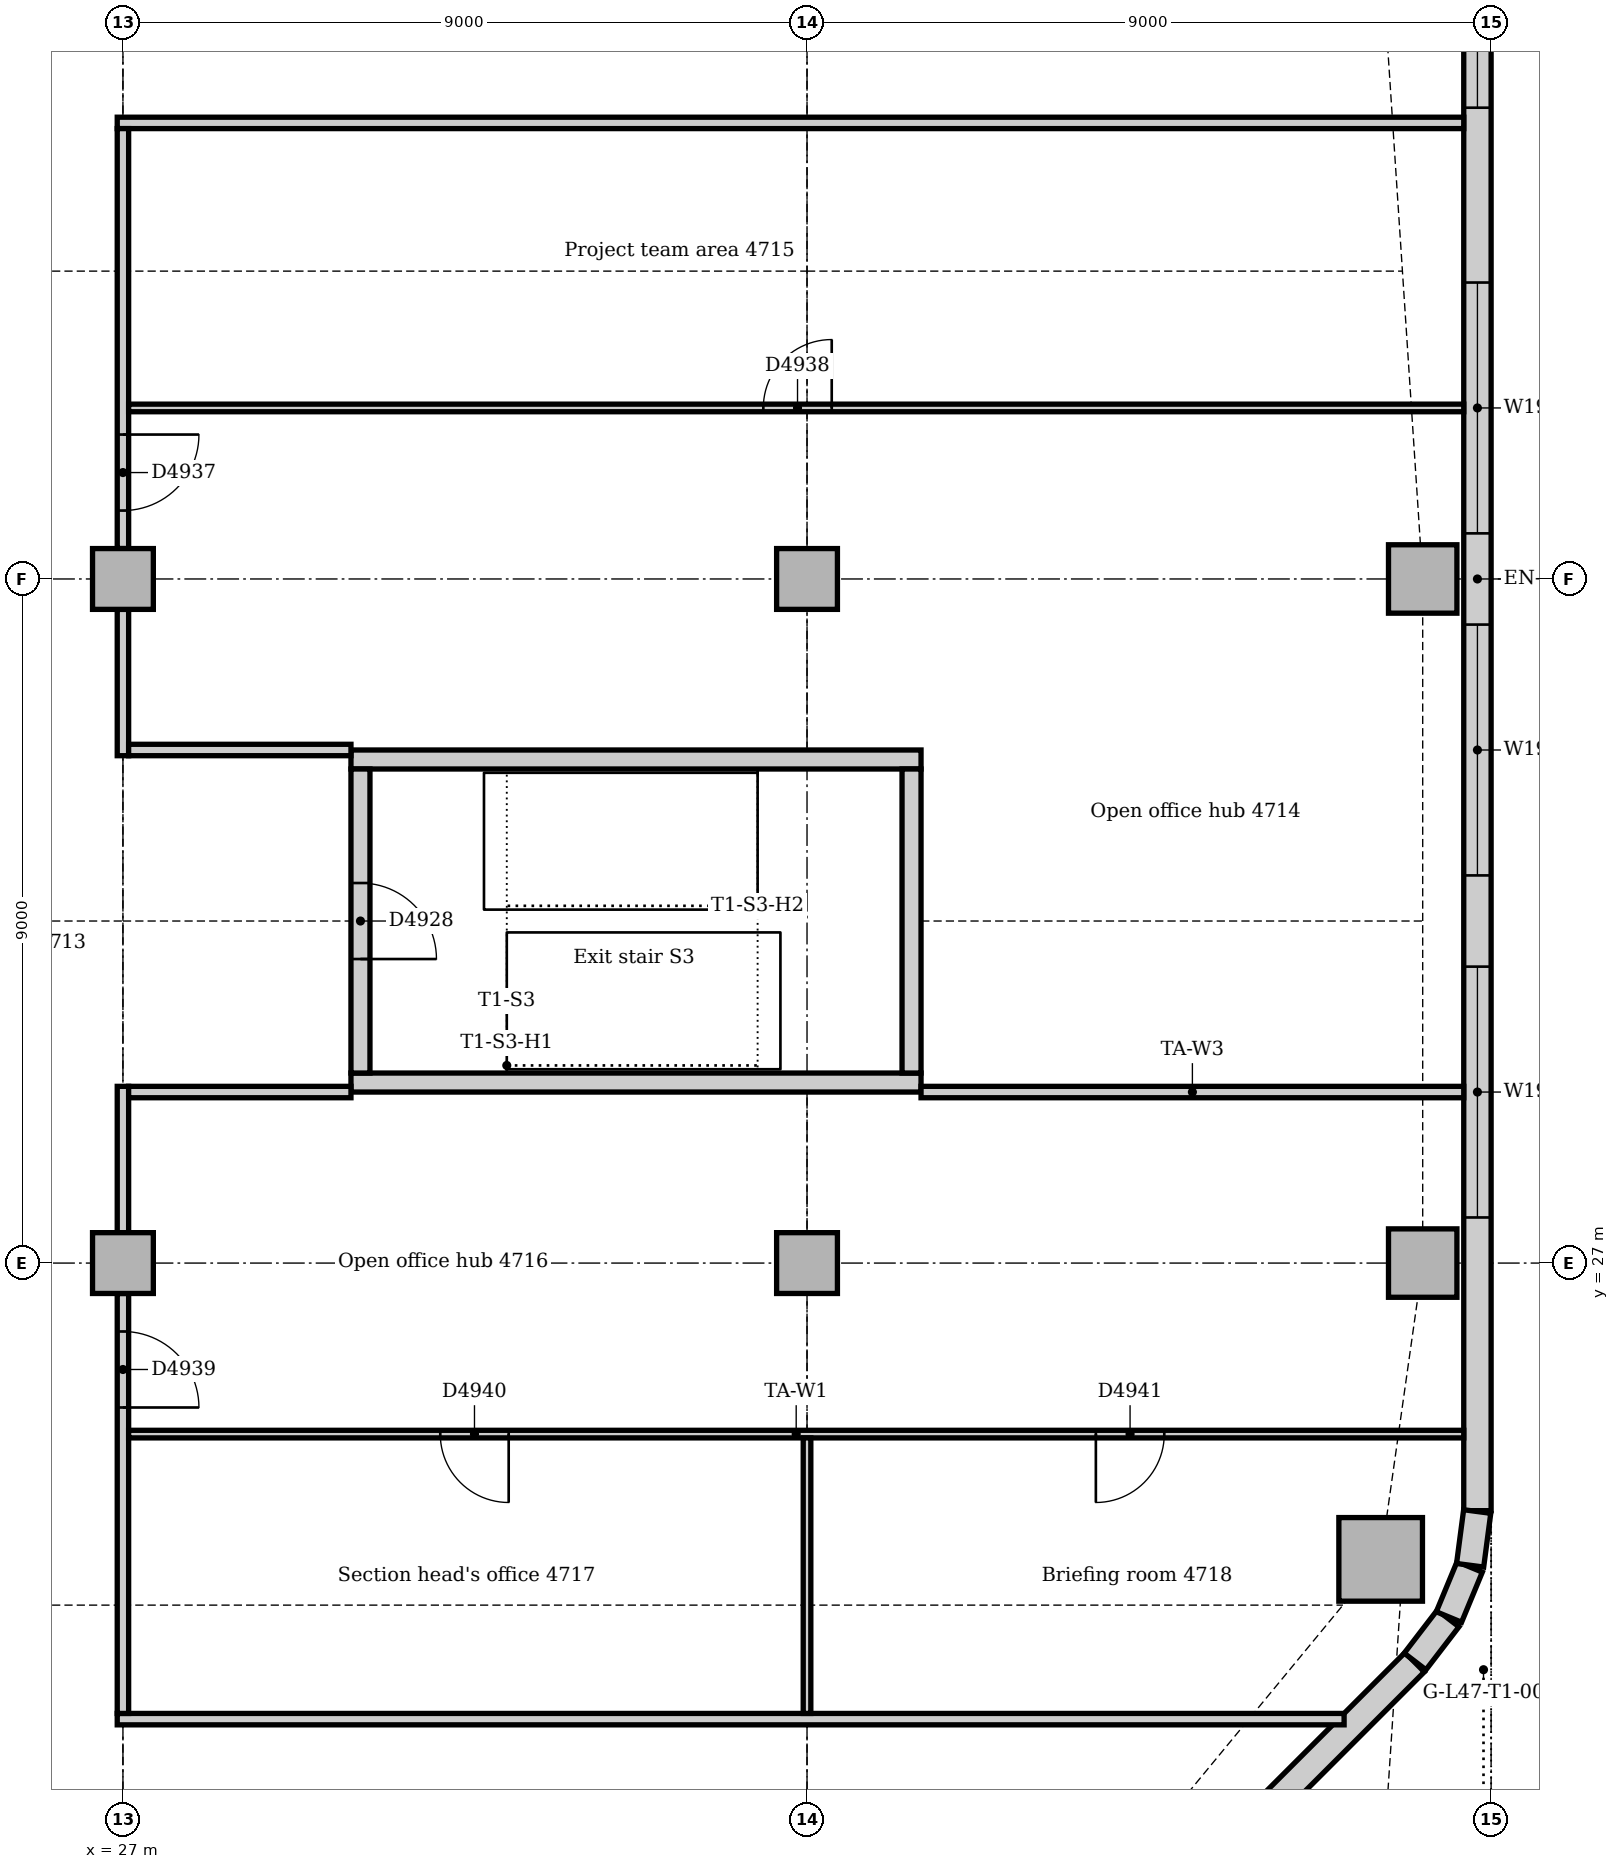
"""IFC4 building model, lengths in metres.
Left out: names, types, materials, properties, quantities, classifications, styles, units other than length and angle.
Written with IfcOpenShell. Run it as: python <this file> out.ifc"""

import sys

from ifc_helpers import new_model, si_unit, direction, frame, frame_2d, origin, origin_2d, place, context, subcontext, project, spatial, rectangle, extrude, element, fill, save


model = new_model("IFC4")
c1 = context("Model", 3, precision=1e-05, world=origin(), true_north=direction((0.0, 1.0)))
c2 = subcontext(c1, "Body", "Model", "MODEL_VIEW")
j1 = project(units=[si_unit("LENGTHUNIT", "METRE"), si_unit("PLANEANGLEUNIT", "RADIAN")], contexts=[c1])
p1 = place(None, origin())
s1 = spatial("IfcSite", under=j1, at=p1, CompositionType="ELEMENT")
p2 = place(p1, origin())
s2 = spatial("IfcBuilding", under=s1, at=p2, CompositionType="ELEMENT")
p3 = place(p2, frame((0.0, 0.0, 198.0)))
s3 = spatial("IfcBuildingStorey", under=s2, at=p3, CompositionType="ELEMENT", Elevation=198.0)
for number, where, z_axis, x_axis in (
    (1, (30.0, 29.375, 0.0), (0.0, 0.0, 1.0), (1.0, 0.0, 0.0)),
    (2, (37.5, 33.625, 0.0), (0.0, 0.0, 1.0), (-1.0, 0.0, 0.0)),
):
    element("IfcWall", number, at=place(p3, frame(where, z_axis=z_axis, x_axis=x_axis)), inside=s3, PredefinedType="SOLIDWALL", context=c2, shape_type="SweptSolid", body=[
        extrude(rectangle(XDim=7.5, YDim=0.25, at=frame_2d((3.75, 0.0))), origin(), (0.0, 0.0, 1.0), 4.0),
    ])
p4 = place(p3, frame((37.375, 29.5, 0.0), z_axis=(0.0, 0.0, 1.0), x_axis=(0.0, 1.0, 0.0)))
e3 = element("IfcWall", 3, at=p4, inside=s3, PredefinedType="SOLIDWALL", context=c2, shape_type="SweptSolid", body=[
    extrude(rectangle(XDim=4.0, YDim=0.25, at=frame_2d((2.0, 0.0))), origin(), (0.0, 0.0, 1.0), 4.0),
])
p5 = place(p3, frame((30.125, 33.5, 0.0), z_axis=(0.0, 0.0, 1.0), x_axis=(0.0, -1.0, 0.0)))
e4 = element("IfcWall", 4, at=p5, inside=s3, PredefinedType="SOLIDWALL", context=c2, shape_type="SweptSolid", body=[
    extrude(rectangle(XDim=4.0, YDim=0.25, at=frame_2d((2.0, 0.0))), origin(), (0.0, 0.0, 1.0), 4.0),
])
p6 = place(p5, frame((1.5, 0.0, 0.0)))
e5 = element("IfcOpeningElement", 5, at=p6, cuts=e4, PredefinedType="OPENING", context=c2, shape_type="SweptSolid", body=[
    extrude(rectangle(XDim=1.0, YDim=2.1, at=frame_2d((0.5, 1.05))), frame((0.0, 0.135, 0.0), z_axis=(0.0, -1.0, 0.0), x_axis=(1.0, 0.0, 0.0)), (0.0, 0.0, 1.0), 0.27),
])
p7 = place(p3, frame((43.547, 23.102, -0.15), z_axis=(0.0, 0.0, 1.0), x_axis=(1.0, 0.0, 0.0)))
e6 = element("IfcColumn", 6, at=p7, inside=s3, PredefinedType="COLUMN", context=c2, shape_type="SweptSolid", body=[
    extrude(rectangle(XDim=1.1, YDim=1.1, at=origin_2d()), origin(), (0.0, 0.0, 1.0), 4.0),
])
for number, where, z_axis, x_axis in (
    (7, (44.1, 27.0, 0.0), (0.0, 0.0, 1.0), (1.0, 0.0, 0.0)),
    (8, (44.1, 36.0, 0.0), (0.0, 0.0, 1.0), (1.0, 0.0, 0.0)),
):
    element("IfcColumn", number, at=place(p3, frame(where, z_axis=z_axis, x_axis=x_axis)), inside=s3, PredefinedType="COLUMN", context=c2, shape_type="SweptSolid", body=[
        extrude(rectangle(XDim=0.9, YDim=0.9, at=origin_2d()), origin(), (0.0, 0.0, 1.0), 3.85),
    ])
for number, where, z_axis, x_axis in (
    (9, (27.0, 27.0, 0.0), (0.0, 0.0, 1.0), (1.0, 0.0, 0.0)),
    (10, (27.0, 36.0, 0.0), (0.0, 0.0, 1.0), (1.0, 0.0, 0.0)),
    (11, (36.0, 27.0, 0.0), (0.0, 0.0, 1.0), (1.0, 0.0, 0.0)),
    (12, (36.0, 36.0, 0.0), (0.0, 0.0, 1.0), (1.0, 0.0, 0.0)),
):
    element("IfcColumn", number, at=place(p3, frame(where, z_axis=z_axis, x_axis=x_axis)), inside=s3, PredefinedType="COLUMN", context=c2, shape_type="SweptSolid", body=[
        extrude(rectangle(XDim=0.8, YDim=0.8, at=origin_2d()), origin(), (0.0, 0.0, 1.0), 3.85),
    ])
p8 = place(p3, frame((36.751, 14.506, 0.0), z_axis=(0.0, 0.0, 1.0), x_axis=(0.707106781187, 0.707106781187, 0.0)))
e13 = element("IfcWall", 13, at=p8, inside=s3, PredefinedType="STANDARD", context=c2, shape_type="SweptSolid", body=[
    extrude(rectangle(XDim=10.243, YDim=0.36, at=frame_2d((5.121, 0.0))), origin(), (0.0, 0.0, 1.0), 3.85),
])
p9 = place(p8, frame((5.021, 0.0, 0.9)))
e14 = element("IfcOpeningElement", 14, at=p9, cuts=e13, PredefinedType="OPENING", context=c2, shape_type="SweptSolid", body=[
    extrude(rectangle(XDim=1.8, YDim=1.6, at=frame_2d((0.9, 0.8))), frame((0.0, 0.19, 0.0), z_axis=(0.0, -1.0, 0.0), x_axis=(1.0, 0.0, 0.0)), (0.0, 0.0, 1.0), 0.38),
])
p10 = place(p3, frame((44.82, 23.743, 0.0), z_axis=(0.0, 0.0, 1.0), x_axis=(0.0, 1.0, 0.0)))
e15 = element("IfcWall", 15, at=p10, inside=s3, PredefinedType="STANDARD", context=c2, shape_type="SweptSolid", body=[
    extrude(rectangle(XDim=24.515, YDim=0.36, at=frame_2d((12.257, 0.0))), origin(), (0.0, 0.0, 1.0), 3.85),
])
p11 = place(p10, frame((3.857, 0.0, 0.9)))
e16 = element("IfcOpeningElement", 16, at=p11, cuts=e15, PredefinedType="OPENING", context=c2, shape_type="SweptSolid", body=[
    extrude(rectangle(XDim=3.3, YDim=1.6, at=frame_2d((1.65, 0.8))), frame((0.0, 0.19, 0.0), z_axis=(0.0, -1.0, 0.0), x_axis=(1.0, 0.0, 0.0)), (0.0, 0.0, 1.0), 0.38),
])
p12 = place(p10, frame((8.357, 0.0, 0.9)))
e17 = element("IfcOpeningElement", 17, at=p12, cuts=e15, PredefinedType="OPENING", context=c2, shape_type="SweptSolid", body=[
    extrude(rectangle(XDim=3.3, YDim=1.6, at=frame_2d((1.65, 0.8))), frame((0.0, 0.19, 0.0), z_axis=(0.0, -1.0, 0.0), x_axis=(1.0, 0.0, 0.0)), (0.0, 0.0, 1.0), 0.38),
])
p13 = place(p10, frame((12.857, 0.0, 0.9)))
e18 = element("IfcOpeningElement", 18, at=p13, cuts=e15, PredefinedType="OPENING", context=c2, shape_type="SweptSolid", body=[
    extrude(rectangle(XDim=3.3, YDim=1.6, at=frame_2d((1.65, 0.8))), frame((0.0, 0.19, 0.0), z_axis=(0.0, -1.0, 0.0), x_axis=(1.0, 0.0, 0.0)), (0.0, 0.0, 1.0), 0.38),
])
p14 = place(p10, frame((18.457, 0.0, 0.9)))
e19 = element("IfcOpeningElement", 19, at=p14, cuts=e15, PredefinedType="OPENING", context=c2, shape_type="SweptSolid", body=[
    extrude(rectangle(XDim=1.8, YDim=1.6, at=frame_2d((0.9, 0.8))), frame((0.0, 0.19, 0.0), z_axis=(0.0, -1.0, 0.0), x_axis=(1.0, 0.0, 0.0)), (0.0, 0.0, 1.0), 0.38),
])
p15 = place(p3, frame((44.0, 21.759, 0.0), z_axis=(0.0, 0.0, 1.0), x_axis=(0.608802368033, 0.793321924995, 0.0)))
e20 = element("IfcWall", 20, at=p15, inside=s3, PredefinedType="STANDARD", context=c2, shape_type="SweptSolid", body=[
    extrude(rectangle(XDim=0.713, YDim=0.36, at=frame_2d((0.357, 0.0))), origin(), (0.0, 0.0, 1.0), 3.85),
])
for number, where, z_axis, x_axis in (
    (21, (44.445, 22.344, 0.0), (0.0, 0.0, 1.0), (0.383, 0.924, 0.0)),
    (22, (44.724, 23.024, 0.0), (0.0, 0.0, 1.0), (0.131, 0.991, 0.0)),
):
    element("IfcWall", number, at=place(p3, frame(where, z_axis=z_axis, x_axis=x_axis)), inside=s3, PredefinedType="STANDARD", context=c2, shape_type="SweptSolid", body=[
        extrude(rectangle(XDim=0.713, YDim=0.36, at=frame_2d((0.356, 0.0))), origin(), (0.0, 0.0, 1.0), 3.85),
    ])
p16 = place(p3, frame((26.925, 42.0, 0.0), z_axis=(0.0, 0.0, 1.0), x_axis=(1.0, 0.0, 0.0)))
e23 = element("IfcWall", 23, at=p16, inside=s3, PredefinedType="PARTITIONING", context=c2, shape_type="SweptSolid", body=[
    extrude(rectangle(XDim=17.715, YDim=0.15, at=frame_2d((8.857, 0.0))), origin(), (0.0, 0.0, 1.0), 3.85),
])
p17 = place(p3, frame((26.925, 21.0, 0.0), z_axis=(0.0, 0.0, 1.0), x_axis=(1.0, 0.0, 0.0)))
e24 = element("IfcWall", 24, at=p17, inside=s3, PredefinedType="PARTITIONING", context=c2, shape_type="SweptSolid", body=[
    extrude(rectangle(XDim=16.141, YDim=0.15, at=frame_2d((8.07, 0.0))), origin(), (0.0, 0.0, 1.0), 3.85),
])
p18 = place(p3, frame((27.0, 21.075, 0.0), z_axis=(0.0, 0.0, 1.0), x_axis=(0.0, 1.0, 0.0)))
e25 = element("IfcWall", 25, at=p18, inside=s3, PredefinedType="PARTITIONING", context=c2, shape_type="SweptSolid", body=[
    extrude(rectangle(XDim=5.525, YDim=0.15, at=frame_2d((2.763, 0.0))), origin(), (0.0, 0.0, 1.0), 3.35),
])
p19 = place(p18, frame((4.025, 0.0, 0.0)))
e26 = element("IfcOpeningElement", 26, at=p19, cuts=e25, PredefinedType="OPENING", context=c2, shape_type="SweptSolid", body=[
    extrude(rectangle(XDim=1.0, YDim=2.1, at=frame_2d((0.5, 1.05))), frame((0.0, 0.085, 0.0), z_axis=(0.0, -1.0, 0.0), x_axis=(1.0, 0.0, 0.0)), (0.0, 0.0, 1.0), 0.17),
])
for number, where, z_axis, x_axis in (
    (27, (27.0, 27.4, 0.0), (0.0, 0.0, 1.0), (0.0, 1.0, 0.0)),
    (28, (27.0, 33.675, 0.0), (0.0, 0.0, 1.0), (0.0, 1.0, 0.0)),
):
    element("IfcWall", number, at=place(p3, frame(where, z_axis=z_axis, x_axis=x_axis)), inside=s3, PredefinedType="PARTITIONING", context=c2, shape_type="SweptSolid", body=[
        extrude(rectangle(XDim=1.925, YDim=0.15, at=frame_2d((0.963, 0.0))), origin(), (0.0, 0.0, 1.0), 3.35),
    ])
p20 = place(p3, frame((27.0, 36.4, 0.0), z_axis=(0.0, 0.0, 1.0), x_axis=(0.0, 1.0, 0.0)))
e29 = element("IfcWall", 29, at=p20, inside=s3, PredefinedType="PARTITIONING", context=c2, shape_type="SweptSolid", body=[
    extrude(rectangle(XDim=5.525, YDim=0.15, at=frame_2d((2.763, 0.0))), origin(), (0.0, 0.0, 1.0), 3.35),
])
p21 = place(p20, frame((0.5, 0.0, 0.0)))
e30 = element("IfcOpeningElement", 30, at=p21, cuts=e29, PredefinedType="OPENING", context=c2, shape_type="SweptSolid", body=[
    extrude(rectangle(XDim=1.0, YDim=2.1, at=frame_2d((0.5, 1.05))), frame((0.0, 0.085, 0.0), z_axis=(0.0, -1.0, 0.0), x_axis=(1.0, 0.0, 0.0)), (0.0, 0.0, 1.0), 0.17),
])
for number, where, z_axis, x_axis in (
    (31, (27.075, 29.25, 0.0), (0.0, 0.0, 1.0), (1.0, 0.0, 0.0)),
    (32, (27.075, 33.75, 0.0), (0.0, 0.0, 1.0), (1.0, 0.0, 0.0)),
):
    element("IfcWall", number, at=place(p3, frame(where, z_axis=z_axis, x_axis=x_axis)), inside=s3, PredefinedType="PARTITIONING", context=c2, shape_type="SweptSolid", body=[
        extrude(rectangle(XDim=2.925, YDim=0.15, at=frame_2d((1.462, 0.0))), origin(), (0.0, 0.0, 1.0), 3.85),
    ])
p22 = place(p3, frame((37.5, 29.25, 0.0), z_axis=(0.0, 0.0, 1.0), x_axis=(1.0, 0.0, 0.0)))
e33 = element("IfcWall", 33, at=p22, inside=s3, PredefinedType="PARTITIONING", context=c2, shape_type="SweptSolid", body=[
    extrude(rectangle(XDim=7.14, YDim=0.15, at=frame_2d((3.57, 0.0))), origin(), (0.0, 0.0, 1.0), 3.85),
])
p23 = place(p3, frame((27.075, 24.75, 0.0), z_axis=(0.0, 0.0, 1.0), x_axis=(1.0, 0.0, 0.0)))
e34 = element("IfcWall", 34, at=p23, inside=s3, PredefinedType="PARTITIONING", context=c2, shape_type="SweptSolid", body=[
    extrude(rectangle(XDim=17.565, YDim=0.1, at=frame_2d((8.783, 0.0))), origin(), (0.0, 0.0, 1.0), 3.85),
])
p24 = place(p23, frame((4.1, 0.0, 0.0)))
e35 = element("IfcOpeningElement", 35, at=p24, cuts=e34, PredefinedType="OPENING", context=c2, shape_type="SweptSolid", body=[
    extrude(rectangle(XDim=0.9, YDim=2.1, at=frame_2d((0.45, 1.05))), frame((0.0, 0.06, 0.0), z_axis=(0.0, -1.0, 0.0), x_axis=(1.0, 0.0, 0.0)), (0.0, 0.0, 1.0), 0.12),
])
p25 = place(p23, frame((12.725, 0.0, 0.0)))
e36 = element("IfcOpeningElement", 36, at=p25, cuts=e34, PredefinedType="OPENING", context=c2, shape_type="SweptSolid", body=[
    extrude(rectangle(XDim=0.9, YDim=2.1, at=frame_2d((0.45, 1.05))), frame((0.0, 0.06, 0.0), z_axis=(0.0, -1.0, 0.0), x_axis=(1.0, 0.0, 0.0)), (0.0, 0.0, 1.0), 0.12),
])
p26 = place(p3, frame((27.075, 38.25, 0.0), z_axis=(0.0, 0.0, 1.0), x_axis=(1.0, 0.0, 0.0)))
e37 = element("IfcWall", 37, at=p26, inside=s3, PredefinedType="PARTITIONING", context=c2, shape_type="SweptSolid", body=[
    extrude(rectangle(XDim=17.565, YDim=0.1, at=frame_2d((8.783, 0.0))), origin(), (0.0, 0.0, 1.0), 3.85),
])
p27 = place(p26, frame((8.35, 0.0, 0.0)))
e38 = element("IfcOpeningElement", 38, at=p27, cuts=e37, PredefinedType="OPENING", context=c2, shape_type="SweptSolid", body=[
    extrude(rectangle(XDim=0.9, YDim=2.1, at=frame_2d((0.45, 1.05))), frame((0.0, 0.06, 0.0), z_axis=(0.0, -1.0, 0.0), x_axis=(1.0, 0.0, 0.0)), (0.0, 0.0, 1.0), 0.12),
])
p28 = place(p3, frame((36.0, 21.075, 0.0), z_axis=(0.0, 0.0, 1.0), x_axis=(0.0, 1.0, 0.0)))
e39 = element("IfcWall", 39, at=p28, inside=s3, PredefinedType="PARTITIONING", context=c2, shape_type="SweptSolid", body=[
    extrude(rectangle(XDim=3.625, YDim=0.1, at=frame_2d((1.812, 0.0))), origin(), (0.0, 0.0, 1.0), 3.35),
])
p29 = place(p11, origin())
e40 = element("IfcWindow", 40, at=p29, inside=s3, PartitioningType="SINGLE_PANEL", PredefinedType="WINDOW", context=c2, shape_type="SweptSolid", body=[
    extrude(rectangle(XDim=3.3, YDim=1.6, at=frame_2d((1.65, 0.8))), frame((0.0, 0.13, 0.0), z_axis=(0.0, -1.0, 0.0), x_axis=(1.0, 0.0, 0.0)), (0.0, 0.0, 1.0), 0.06),
])
fill(e16, e40)
p30 = place(p12, origin())
e41 = element("IfcWindow", 41, at=p30, inside=s3, PartitioningType="SINGLE_PANEL", PredefinedType="WINDOW", context=c2, shape_type="SweptSolid", body=[
    extrude(rectangle(XDim=3.3, YDim=1.6, at=frame_2d((1.65, 0.8))), frame((0.0, 0.13, 0.0), z_axis=(0.0, -1.0, 0.0), x_axis=(1.0, 0.0, 0.0)), (0.0, 0.0, 1.0), 0.06),
])
fill(e17, e41)
p31 = place(p13, origin())
e42 = element("IfcWindow", 42, at=p31, inside=s3, PartitioningType="SINGLE_PANEL", PredefinedType="WINDOW", context=c2, shape_type="SweptSolid", body=[
    extrude(rectangle(XDim=3.3, YDim=1.6, at=frame_2d((1.65, 0.8))), frame((0.0, 0.13, 0.0), z_axis=(0.0, -1.0, 0.0), x_axis=(1.0, 0.0, 0.0)), (0.0, 0.0, 1.0), 0.06),
])
fill(e18, e42)
p32 = place(p14, origin())
e43 = element("IfcWindow", 43, at=p32, inside=s3, PartitioningType="SINGLE_PANEL", PredefinedType="WINDOW", context=c2, shape_type="SweptSolid", body=[
    extrude(rectangle(XDim=1.8, YDim=1.6, at=frame_2d((0.9, 0.8))), frame((0.0, 0.13, 0.0), z_axis=(0.0, -1.0, 0.0), x_axis=(1.0, 0.0, 0.0)), (0.0, 0.0, 1.0), 0.06),
])
fill(e19, e43)
p33 = place(p6, origin())
e44 = element("IfcDoor", 44, at=p33, inside=s3, OperationType="SINGLE_SWING_RIGHT", PredefinedType="DOOR", context=c2, shape_type="SweptSolid", body=[
    extrude(rectangle(XDim=1.0, YDim=2.1, at=frame_2d((0.5, 1.05))), frame((0.0, 0.025, 0.0), z_axis=(0.0, -1.0, 0.0), x_axis=(1.0, 0.0, 0.0)), (0.0, 0.0, 1.0), 0.05),
])
fill(e5, e44)
p34 = place(p21, frame((1.0, 0.0, 0.0), z_axis=(0.0, 0.0, 1.0), x_axis=(-1.0, 0.0, 0.0)))
e45 = element("IfcDoor", 45, at=p34, inside=s3, OperationType="SINGLE_SWING_LEFT", PredefinedType="DOOR", context=c2, shape_type="SweptSolid", body=[
    extrude(rectangle(XDim=1.0, YDim=2.1, at=frame_2d((0.5, 1.05))), frame((0.0, 0.025, 0.0), z_axis=(0.0, -1.0, 0.0), x_axis=(1.0, 0.0, 0.0)), (0.0, 0.0, 1.0), 0.05),
])
fill(e30, e45)
p35 = place(p27, origin())
e46 = element("IfcDoor", 46, at=p35, inside=s3, OperationType="SINGLE_SWING_RIGHT", PredefinedType="DOOR", context=c2, shape_type="SweptSolid", body=[
    extrude(rectangle(XDim=0.9, YDim=2.1, at=frame_2d((0.45, 1.05))), frame((0.0, 0.025, 0.0), z_axis=(0.0, -1.0, 0.0), x_axis=(1.0, 0.0, 0.0)), (0.0, 0.0, 1.0), 0.05),
])
fill(e38, e46)
p36 = place(p19, frame((1.0, 0.0, 0.0), z_axis=(0.0, 0.0, 1.0), x_axis=(-1.0, 0.0, 0.0)))
e47 = element("IfcDoor", 47, at=p36, inside=s3, OperationType="SINGLE_SWING_RIGHT", PredefinedType="DOOR", context=c2, shape_type="SweptSolid", body=[
    extrude(rectangle(XDim=1.0, YDim=2.1, at=frame_2d((0.5, 1.05))), frame((0.0, 0.025, 0.0), z_axis=(0.0, -1.0, 0.0), x_axis=(1.0, 0.0, 0.0)), (0.0, 0.0, 1.0), 0.05),
])
fill(e26, e47)
p37 = place(p24, frame((0.9, 0.0, 0.0), z_axis=(0.0, 0.0, 1.0), x_axis=(-1.0, 0.0, 0.0)))
e48 = element("IfcDoor", 48, at=p37, inside=s3, OperationType="SINGLE_SWING_LEFT", PredefinedType="DOOR", context=c2, shape_type="SweptSolid", body=[
    extrude(rectangle(XDim=0.9, YDim=2.1, at=frame_2d((0.45, 1.05))), frame((0.0, 0.025, 0.0), z_axis=(0.0, -1.0, 0.0), x_axis=(1.0, 0.0, 0.0)), (0.0, 0.0, 1.0), 0.05),
])
fill(e35, e48)
p38 = place(p25, frame((0.9, 0.0, 0.0), z_axis=(0.0, 0.0, 1.0), x_axis=(-1.0, 0.0, 0.0)))
e49 = element("IfcDoor", 49, at=p38, inside=s3, OperationType="SINGLE_SWING_RIGHT", PredefinedType="DOOR", context=c2, shape_type="SweptSolid", body=[
    extrude(rectangle(XDim=0.9, YDim=2.1, at=frame_2d((0.45, 1.05))), frame((0.0, 0.025, 0.0), z_axis=(0.0, -1.0, 0.0), x_axis=(1.0, 0.0, 0.0)), (0.0, 0.0, 1.0), 0.05),
])
fill(e36, e49)
save(model, sys.argv[1])
